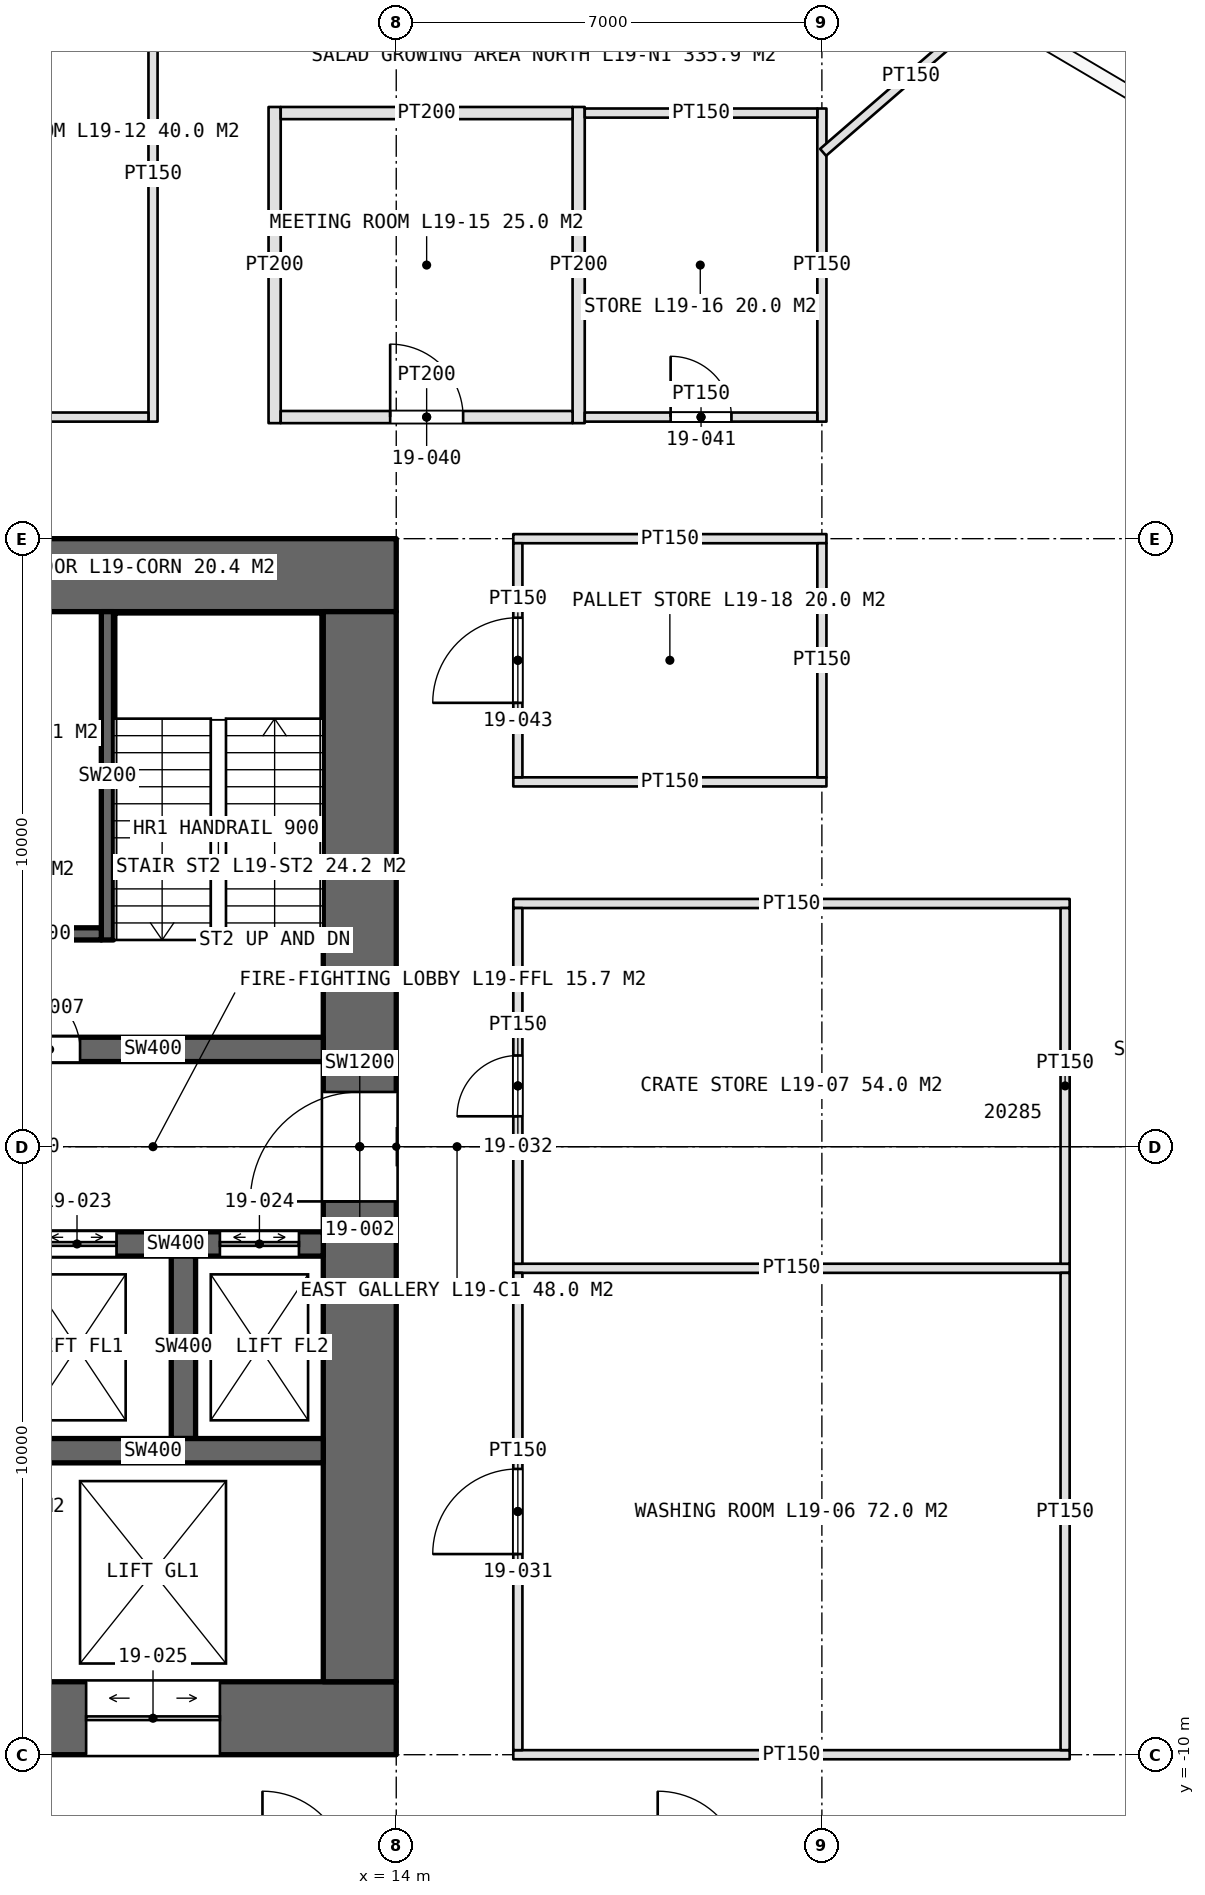
"""IFC4 building model, lengths in metres.
Left out: names, types, materials, properties, quantities, classifications, styles, units other than length and angle.
Written with IfcOpenShell. Run it as: python <this file> out.ifc"""

import sys

from ifc_helpers import new_model, si_unit, direction, frame, frame_2d, origin, place, context, subcontext, project, spatial, rectangle, extrude, element, fill, save


model = new_model("IFC4")
c1 = context("Model", 3, precision=1e-05, world=origin(), true_north=direction((0.0, 1.0)))
c2 = subcontext(c1, "Body", "Model", "MODEL_VIEW")
j1 = project(units=[si_unit("LENGTHUNIT", "METRE"), si_unit("PLANEANGLEUNIT", "RADIAN")], contexts=[c1])
p1 = place(None, origin())
s1 = spatial("IfcSite", under=j1, at=p1, CompositionType="ELEMENT")
p2 = place(p1, origin())
s2 = spatial("IfcBuilding", under=s1, at=p2, CompositionType="ELEMENT")
p3 = place(p2, frame((0.0, 0.0, 95.0)))
s3 = spatial("IfcBuildingStorey", under=s2, at=p3, CompositionType="ELEMENT", Elevation=95.0)
p4 = place(p3, frame((-14.0, -9.4, 0.0), z_axis=(0.0, 0.0, 1.0), x_axis=(1.0, 0.0, 0.0)))
e1 = element("IfcWall", 1, at=p4, inside=s3, PredefinedType="SHEAR", context=c2, shape_type="SweptSolid", body=[
    extrude(rectangle(XDim=28.0, YDim=1.2, at=frame_2d((14.0, 0.0))), origin(), (0.0, 0.0, 1.0), 5.0),
])
p5 = place(p4, frame((13.1, 0.0, 0.0)))
e2 = element("IfcOpeningElement", 2, at=p5, cuts=e1, PredefinedType="OPENING", context=c2, shape_type="SweptSolid", body=[
    extrude(rectangle(XDim=1.8, YDim=2.4, at=frame_2d((0.9, 1.2))), frame((0.0, 0.61, 0.0), z_axis=(0.0, -1.0, 0.0), x_axis=(1.0, 0.0, 0.0)), (0.0, 0.0, 1.0), 1.22),
])
p6 = place(p4, frame((22.9, 0.0, 0.0)))
e3 = element("IfcOpeningElement", 3, at=p6, cuts=e1, PredefinedType="OPENING", context=c2, shape_type="SweptSolid", body=[
    extrude(rectangle(XDim=2.2, YDim=2.7, at=frame_2d((1.1, 1.35))), frame((0.0, 0.61, 0.0), z_axis=(0.0, -1.0, 0.0), x_axis=(1.0, 0.0, 0.0)), (0.0, 0.0, 1.0), 1.22),
])
p7 = place(p3, frame((14.0, 9.4, 0.0), z_axis=(0.0, 0.0, 1.0), x_axis=(-1.0, 0.0, 0.0)))
e4 = element("IfcWall", 4, at=p7, inside=s3, PredefinedType="SHEAR", context=c2, shape_type="SweptSolid", body=[
    extrude(rectangle(XDim=28.0, YDim=1.2, at=frame_2d((14.0, 0.0))), origin(), (0.0, 0.0, 1.0), 5.0),
])
p8 = place(p7, frame((24.0, 0.0, 0.0)))
e5 = element("IfcOpeningElement", 5, at=p8, cuts=e4, PredefinedType="OPENING", context=c2, shape_type="SweptSolid", body=[
    extrude(rectangle(XDim=1.0, YDim=2.4, at=frame_2d((0.5, 1.2))), frame((0.0, 0.61, 0.0), z_axis=(0.0, -1.0, 0.0), x_axis=(1.0, 0.0, 0.0)), (0.0, 0.0, 1.0), 1.22),
])
p9 = place(p7, frame((13.1, 0.0, 0.0)))
e6 = element("IfcOpeningElement", 6, at=p9, cuts=e4, PredefinedType="OPENING", context=c2, shape_type="SweptSolid", body=[
    extrude(rectangle(XDim=1.8, YDim=2.4, at=frame_2d((0.9, 1.2))), frame((0.0, 0.61, 0.0), z_axis=(0.0, -1.0, 0.0), x_axis=(1.0, 0.0, 0.0)), (0.0, 0.0, 1.0), 1.22),
])
p10 = place(p3, frame((13.4, -8.8, 0.0), z_axis=(0.0, 0.0, 1.0), x_axis=(0.0, 1.0, 0.0)))
e7 = element("IfcWall", 7, at=p10, inside=s3, PredefinedType="SHEAR", context=c2, shape_type="SweptSolid", body=[
    extrude(rectangle(XDim=17.6, YDim=1.2, at=frame_2d((8.8, 0.0))), origin(), (0.0, 0.0, 1.0), 5.0),
])
p11 = place(p10, frame((7.9, 0.0, 0.0)))
e8 = element("IfcOpeningElement", 8, at=p11, cuts=e7, PredefinedType="OPENING", context=c2, shape_type="SweptSolid", body=[
    extrude(rectangle(XDim=1.8, YDim=2.4, at=frame_2d((0.9, 1.2))), frame((0.0, 0.61, 0.0), z_axis=(0.0, -1.0, 0.0), x_axis=(1.0, 0.0, 0.0)), (0.0, 0.0, 1.0), 1.22),
])
p12 = place(p3, frame((7.2, 1.6, 0.0), z_axis=(0.0, 0.0, 1.0), x_axis=(1.0, 0.0, 0.0)))
e9 = element("IfcWall", 9, at=p12, inside=s3, PredefinedType="SHEAR", context=c2, shape_type="SweptSolid", body=[
    extrude(rectangle(XDim=5.6, YDim=0.4, at=frame_2d((2.8, 0.0))), origin(), (0.0, 0.0, 1.0), 5.0),
])
p13 = place(p12, frame((0.6, 0.0, 0.0)))
e10 = element("IfcOpeningElement", 10, at=p13, cuts=e9, PredefinedType="OPENING", context=c2, shape_type="SweptSolid", body=[
    extrude(rectangle(XDim=1.0, YDim=2.4, at=frame_2d((0.5, 1.2))), frame((0.0, 0.21, 0.0), z_axis=(0.0, -1.0, 0.0), x_axis=(1.0, 0.0, 0.0)), (0.0, 0.0, 1.0), 0.42),
])
p14 = place(p3, frame((7.2, -1.6, 0.0), z_axis=(0.0, 0.0, 1.0), x_axis=(1.0, 0.0, 0.0)))
e11 = element("IfcWall", 11, at=p14, inside=s3, PredefinedType="SHEAR", context=c2, shape_type="SweptSolid", body=[
    extrude(rectangle(XDim=5.6, YDim=0.4, at=frame_2d((2.8, 0.0))), origin(), (0.0, 0.0, 1.0), 5.0),
])
p15 = place(p14, frame((0.9, 0.0, 0.0)))
e12 = element("IfcOpeningElement", 12, at=p15, cuts=e11, PredefinedType="OPENING", context=c2, shape_type="SweptSolid", body=[
    extrude(rectangle(XDim=1.3, YDim=2.4, at=frame_2d((0.65, 1.2))), frame((0.0, 0.21, 0.0), z_axis=(0.0, -1.0, 0.0), x_axis=(1.0, 0.0, 0.0)), (0.0, 0.0, 1.0), 0.42),
])
p16 = place(p14, frame((3.9, 0.0, 0.0)))
e13 = element("IfcOpeningElement", 13, at=p16, cuts=e11, PredefinedType="OPENING", context=c2, shape_type="SweptSolid", body=[
    extrude(rectangle(XDim=1.3, YDim=2.4, at=frame_2d((0.65, 1.2))), frame((0.0, 0.21, 0.0), z_axis=(0.0, -1.0, 0.0), x_axis=(1.0, 0.0, 0.0)), (0.0, 0.0, 1.0), 0.42),
])
p17 = place(p3, frame((10.5, -4.8, 0.0), z_axis=(0.0, 0.0, 1.0), x_axis=(0.0, 1.0, 0.0)))
e14 = element("IfcWall", 14, at=p17, inside=s3, PredefinedType="SHEAR", context=c2, shape_type="SweptSolid", body=[
    extrude(rectangle(XDim=3.0, YDim=0.4, at=frame_2d((1.5, 0.0))), origin(), (0.0, 0.0, 1.0), 5.0),
])
p18 = place(p3, frame((7.2, -5.0, 0.0), z_axis=(0.0, 0.0, 1.0), x_axis=(1.0, 0.0, 0.0)))
e15 = element("IfcWall", 15, at=p18, inside=s3, PredefinedType="SHEAR", context=c2, shape_type="SweptSolid", body=[
    extrude(rectangle(XDim=5.6, YDim=0.4, at=frame_2d((2.8, 0.0))), origin(), (0.0, 0.0, 1.0), 5.0),
])
p19 = place(p3, frame((9.25, 3.4, 0.0), z_axis=(0.0, 0.0, 1.0), x_axis=(0.0, 1.0, 0.0)))
e16 = element("IfcWall", 16, at=p19, inside=s3, PredefinedType="SOLIDWALL", context=c2, shape_type="SweptSolid", body=[
    extrude(rectangle(XDim=5.4, YDim=0.2, at=frame_2d((2.7, 0.0))), origin(), (0.0, 0.0, 1.0), 5.0),
])
p20 = place(p3, frame((9.15, 3.5, 0.0), z_axis=(0.0, 0.0, 1.0), x_axis=(-1.0, 0.0, 0.0)))
e17 = element("IfcWall", 17, at=p20, inside=s3, PredefinedType="SOLIDWALL", context=c2, shape_type="SweptSolid", body=[
    extrude(rectangle(XDim=1.95, YDim=0.2, at=frame_2d((0.975, 0.0))), origin(), (0.0, 0.0, 1.0), 5.0),
])
for number, where, z_axis, x_axis in (
    (18, (15.925, -10.0, 0.0), (0.0, 0.0, 1.0), (1.0, 0.0, 0.0)),
    (19, (15.925, -2.0, 0.0), (0.0, 0.0, 1.0), (1.0, 0.0, 0.0)),
    (20, (15.925, 4.0, 0.0), (0.0, 0.0, 1.0), (1.0, 0.0, 0.0)),
):
    element("IfcWall", number, at=place(p3, frame(where, z_axis=z_axis, x_axis=x_axis)), inside=s3, PredefinedType="PARTITIONING", context=c2, shape_type="SweptSolid", body=[
        extrude(rectangle(XDim=9.15, YDim=0.15, at=frame_2d((4.575, 0.0))), origin(), (0.0, 0.0, 1.0), 3.6),
    ])
p21 = place(p3, frame((16.0, -9.925, 0.0), z_axis=(0.0, 0.0, 1.0), x_axis=(0.0, 1.0, 0.0)))
e21 = element("IfcWall", 21, at=p21, inside=s3, PredefinedType="PARTITIONING", context=c2, shape_type="SweptSolid", body=[
    extrude(rectangle(XDim=7.85, YDim=0.15, at=frame_2d((3.925, 0.0))), origin(), (0.0, 0.0, 1.0), 3.6),
])
p22 = place(p21, frame((3.225, 0.0, 0.0)))
e22 = element("IfcOpeningElement", 22, at=p22, cuts=e21, PredefinedType="OPENING", context=c2, shape_type="SweptSolid", body=[
    extrude(rectangle(XDim=1.4, YDim=2.4, at=frame_2d((0.7, 1.2))), frame((0.0, 0.085, 0.0), z_axis=(0.0, -1.0, 0.0), x_axis=(1.0, 0.0, 0.0)), (0.0, 0.0, 1.0), 0.17),
])
p23 = place(p3, frame((25.0, -9.925, 0.0), z_axis=(0.0, 0.0, 1.0), x_axis=(0.0, 1.0, 0.0)))
e23 = element("IfcWall", 23, at=p23, inside=s3, PredefinedType="PARTITIONING", context=c2, shape_type="SweptSolid", body=[
    extrude(rectangle(XDim=7.85, YDim=0.15, at=frame_2d((3.925, 0.0))), origin(), (0.0, 0.0, 1.0), 3.6),
])
p24 = place(p3, frame((16.0, -1.925, 0.0), z_axis=(0.0, 0.0, 1.0), x_axis=(0.0, 1.0, 0.0)))
e24 = element("IfcWall", 24, at=p24, inside=s3, PredefinedType="PARTITIONING", context=c2, shape_type="SweptSolid", body=[
    extrude(rectangle(XDim=5.85, YDim=0.15, at=frame_2d((2.925, 0.0))), origin(), (0.0, 0.0, 1.0), 3.6),
])
p25 = place(p24, frame((2.425, 0.0, 0.0)))
e25 = element("IfcOpeningElement", 25, at=p25, cuts=e24, PredefinedType="OPENING", context=c2, shape_type="SweptSolid", body=[
    extrude(rectangle(XDim=1.0, YDim=2.2, at=frame_2d((0.5, 1.1))), frame((0.0, 0.085, 0.0), z_axis=(0.0, -1.0, 0.0), x_axis=(1.0, 0.0, 0.0)), (0.0, 0.0, 1.0), 0.17),
])
p26 = place(p3, frame((25.0, -1.925, 0.0), z_axis=(0.0, 0.0, 1.0), x_axis=(0.0, 1.0, 0.0)))
e26 = element("IfcWall", 26, at=p26, inside=s3, PredefinedType="PARTITIONING", context=c2, shape_type="SweptSolid", body=[
    extrude(rectangle(XDim=5.85, YDim=0.15, at=frame_2d((2.925, 0.0))), origin(), (0.0, 0.0, 1.0), 3.6),
])
p27 = place(p3, frame((10.0, 11.925, 0.0), z_axis=(0.0, 0.0, 1.0), x_axis=(0.0, 1.0, 0.0)))
e27 = element("IfcWall", 27, at=p27, inside=s3, PredefinedType="PARTITIONING", context=c2, shape_type="SweptSolid", body=[
    extrude(rectangle(XDim=8.15, YDim=0.15, at=frame_2d((4.075, 0.0))), origin(), (0.0, 0.0, 1.0), 3.6),
])
p28 = place(p3, frame((5.075, 12.0, 0.0), z_axis=(0.0, 0.0, 1.0), x_axis=(1.0, 0.0, 0.0)))
e28 = element("IfcWall", 28, at=p28, inside=s3, PredefinedType="PARTITIONING", context=c2, shape_type="SweptSolid", body=[
    extrude(rectangle(XDim=4.85, YDim=0.15, at=frame_2d((2.425, 0.0))), origin(), (0.0, 0.0, 1.0), 3.6),
])
p29 = place(p28, frame((1.925, 0.0, 0.0)))
e29 = element("IfcOpeningElement", 29, at=p29, cuts=e28, PredefinedType="OPENING", context=c2, shape_type="SweptSolid", body=[
    extrude(rectangle(XDim=1.0, YDim=2.2, at=frame_2d((0.5, 1.1))), frame((0.0, 0.085, 0.0), z_axis=(0.0, -1.0, 0.0), x_axis=(1.0, 0.0, 0.0)), (0.0, 0.0, 1.0), 0.17),
])
for number, where, z_axis, x_axis in (
    (30, (12.0, 11.9, 0.0), (0.0, 0.0, 1.0), (0.0, 1.0, 0.0)),
    (31, (17.0, 11.9, 0.0), (0.0, 0.0, 1.0), (0.0, 1.0, 0.0)),
):
    element("IfcWall", number, at=place(p3, frame(where, z_axis=z_axis, x_axis=x_axis)), inside=s3, PredefinedType="PARTITIONING", context=c2, shape_type="SweptSolid", body=[
        extrude(rectangle(XDim=5.2, YDim=0.2, at=frame_2d((2.6, 0.0))), origin(), (0.0, 0.0, 1.0), 3.6),
    ])
p30 = place(p3, frame((21.0, 11.925, 0.0), z_axis=(0.0, 0.0, 1.0), x_axis=(0.0, 1.0, 0.0)))
e32 = element("IfcWall", 32, at=p30, inside=s3, PredefinedType="PARTITIONING", context=c2, shape_type="SweptSolid", body=[
    extrude(rectangle(XDim=5.15, YDim=0.15, at=frame_2d((2.575, 0.0))), origin(), (0.0, 0.0, 1.0), 3.6),
])
p31 = place(p3, frame((12.1, 12.0, 0.0), z_axis=(0.0, 0.0, 1.0), x_axis=(1.0, 0.0, 0.0)))
e33 = element("IfcWall", 33, at=p31, inside=s3, PredefinedType="PARTITIONING", context=c2, shape_type="SweptSolid", body=[
    extrude(rectangle(XDim=4.8, YDim=0.2, at=frame_2d((2.4, 0.0))), origin(), (0.0, 0.0, 1.0), 3.6),
])
p32 = place(p31, frame((1.8, 0.0, 0.0)))
e34 = element("IfcOpeningElement", 34, at=p32, cuts=e33, PredefinedType="OPENING", context=c2, shape_type="SweptSolid", body=[
    extrude(rectangle(XDim=1.2, YDim=2.4, at=frame_2d((0.6, 1.2))), frame((0.0, 0.11, 0.0), z_axis=(0.0, -1.0, 0.0), x_axis=(1.0, 0.0, 0.0)), (0.0, 0.0, 1.0), 0.22),
])
p33 = place(p3, frame((12.1, 17.0, 0.0), z_axis=(0.0, 0.0, 1.0), x_axis=(1.0, 0.0, 0.0)))
e35 = element("IfcWall", 35, at=p33, inside=s3, PredefinedType="PARTITIONING", context=c2, shape_type="SweptSolid", body=[
    extrude(rectangle(XDim=4.8, YDim=0.2, at=frame_2d((2.4, 0.0))), origin(), (0.0, 0.0, 1.0), 3.6),
])
p34 = place(p3, frame((17.1, 12.0, 0.0), z_axis=(0.0, 0.0, 1.0), x_axis=(1.0, 0.0, 0.0)))
e36 = element("IfcWall", 36, at=p34, inside=s3, PredefinedType="PARTITIONING", context=c2, shape_type="SweptSolid", body=[
    extrude(rectangle(XDim=3.825, YDim=0.15, at=frame_2d((1.913, 0.0))), origin(), (0.0, 0.0, 1.0), 3.6),
])
p35 = place(p34, frame((1.413, 0.0, 0.0)))
e37 = element("IfcOpeningElement", 37, at=p35, cuts=e36, PredefinedType="OPENING", context=c2, shape_type="SweptSolid", body=[
    extrude(rectangle(XDim=1.0, YDim=2.2, at=frame_2d((0.5, 1.1))), frame((0.0, 0.085, 0.0), z_axis=(0.0, -1.0, 0.0), x_axis=(1.0, 0.0, 0.0)), (0.0, 0.0, 1.0), 0.17),
])
p36 = place(p3, frame((17.1, 17.0, 0.0), z_axis=(0.0, 0.0, 1.0), x_axis=(1.0, 0.0, 0.0)))
e38 = element("IfcWall", 38, at=p36, inside=s3, PredefinedType="PARTITIONING", context=c2, shape_type="SweptSolid", body=[
    extrude(rectangle(XDim=3.825, YDim=0.15, at=frame_2d((1.913, 0.0))), origin(), (0.0, 0.0, 1.0), 3.6),
])
for number, where, z_axis, x_axis in (
    (39, (15.925, 6.0, 0.0), (0.0, 0.0, 1.0), (1.0, 0.0, 0.0)),
    (40, (15.925, 10.0, 0.0), (0.0, 0.0, 1.0), (1.0, 0.0, 0.0)),
):
    element("IfcWall", number, at=place(p3, frame(where, z_axis=z_axis, x_axis=x_axis)), inside=s3, PredefinedType="PARTITIONING", context=c2, shape_type="SweptSolid", body=[
        extrude(rectangle(XDim=5.15, YDim=0.15, at=frame_2d((2.575, 0.0))), origin(), (0.0, 0.0, 1.0), 3.6),
    ])
p37 = place(p3, frame((16.0, 6.075, 0.0), z_axis=(0.0, 0.0, 1.0), x_axis=(0.0, 1.0, 0.0)))
e41 = element("IfcWall", 41, at=p37, inside=s3, PredefinedType="PARTITIONING", context=c2, shape_type="SweptSolid", body=[
    extrude(rectangle(XDim=3.85, YDim=0.15, at=frame_2d((1.925, 0.0))), origin(), (0.0, 0.0, 1.0), 3.6),
])
p38 = place(p37, frame((1.225, 0.0, 0.0)))
e42 = element("IfcOpeningElement", 42, at=p38, cuts=e41, PredefinedType="OPENING", context=c2, shape_type="SweptSolid", body=[
    extrude(rectangle(XDim=1.4, YDim=2.4, at=frame_2d((0.7, 1.2))), frame((0.0, 0.085, 0.0), z_axis=(0.0, -1.0, 0.0), x_axis=(1.0, 0.0, 0.0)), (0.0, 0.0, 1.0), 0.17),
])
p39 = place(p3, frame((21.0, 6.075, 0.0), z_axis=(0.0, 0.0, 1.0), x_axis=(0.0, 1.0, 0.0)))
e43 = element("IfcWall", 43, at=p39, inside=s3, PredefinedType="PARTITIONING", context=c2, shape_type="SweptSolid", body=[
    extrude(rectangle(XDim=3.85, YDim=0.15, at=frame_2d((1.925, 0.0))), origin(), (0.0, 0.0, 1.0), 3.6),
])
p40 = place(p3, frame((21.02, 16.354, 0.0), z_axis=(0.0, 0.0, 1.0), x_axis=(0.755425653008, 0.655234372402, 0.0)))
e44 = element("IfcWall", 44, at=p40, inside=s3, PredefinedType="PARTITIONING", context=c2, shape_type="SweptSolid", body=[
    extrude(rectangle(XDim=3.823, YDim=0.15, at=frame_2d((1.912, 0.0))), origin(), (0.0, 0.0, 1.0), 3.6),
])
p41 = place(p11, origin())
e45 = element("IfcDoor", 45, at=p41, inside=s3, OperationType="DOUBLE_DOOR_SINGLE_SWING", PredefinedType="DOOR", context=c2, shape_type="SweptSolid", body=[
    extrude(rectangle(XDim=1.8, YDim=2.4, at=frame_2d((0.9, 1.2))), frame((0.0, 0.025, 0.0), z_axis=(0.0, -1.0, 0.0), x_axis=(1.0, 0.0, 0.0)), (0.0, 0.0, 1.0), 0.05),
])
fill(e8, e45)
p42 = place(p13, origin())
e46 = element("IfcDoor", 46, at=p42, inside=s3, OperationType="SINGLE_SWING_LEFT", PredefinedType="DOOR", context=c2, shape_type="SweptSolid", body=[
    extrude(rectangle(XDim=1.0, YDim=2.4, at=frame_2d((0.5, 1.2))), frame((0.0, 0.025, 0.0), z_axis=(0.0, -1.0, 0.0), x_axis=(1.0, 0.0, 0.0)), (0.0, 0.0, 1.0), 0.05),
])
fill(e10, e46)
p43 = place(p15, origin())
e47 = element("IfcDoor", 47, at=p43, inside=s3, OperationType="DOUBLE_DOOR_SLIDING", PredefinedType="DOOR", context=c2, shape_type="SweptSolid", body=[
    extrude(rectangle(XDim=1.3, YDim=2.4, at=frame_2d((0.65, 1.2))), frame((0.0, 0.025, 0.0), z_axis=(0.0, -1.0, 0.0), x_axis=(1.0, 0.0, 0.0)), (0.0, 0.0, 1.0), 0.05),
])
fill(e12, e47)
p44 = place(p16, origin())
e48 = element("IfcDoor", 48, at=p44, inside=s3, OperationType="DOUBLE_DOOR_SLIDING", PredefinedType="DOOR", context=c2, shape_type="SweptSolid", body=[
    extrude(rectangle(XDim=1.3, YDim=2.4, at=frame_2d((0.65, 1.2))), frame((0.0, 0.025, 0.0), z_axis=(0.0, -1.0, 0.0), x_axis=(1.0, 0.0, 0.0)), (0.0, 0.0, 1.0), 0.05),
])
fill(e13, e48)
p45 = place(p6, origin())
e49 = element("IfcDoor", 49, at=p45, inside=s3, OperationType="DOUBLE_DOOR_SLIDING", PredefinedType="DOOR", context=c2, shape_type="SweptSolid", body=[
    extrude(rectangle(XDim=2.2, YDim=2.7, at=frame_2d((1.1, 1.35))), frame((0.0, 0.025, 0.0), z_axis=(0.0, -1.0, 0.0), x_axis=(1.0, 0.0, 0.0)), (0.0, 0.0, 1.0), 0.05),
])
fill(e3, e49)
p46 = place(p22, origin())
e50 = element("IfcDoor", 50, at=p46, inside=s3, OperationType="DOUBLE_DOOR_DOUBLE_SWING", PredefinedType="DOOR", context=c2, shape_type="SweptSolid", body=[
    extrude(rectangle(XDim=1.4, YDim=2.4, at=frame_2d((0.7, 1.2))), frame((0.0, 0.025, 0.0), z_axis=(0.0, -1.0, 0.0), x_axis=(1.0, 0.0, 0.0)), (0.0, 0.0, 1.0), 0.05),
])
fill(e22, e50)
p47 = place(p25, origin())
e51 = element("IfcDoor", 51, at=p47, inside=s3, OperationType="SINGLE_SWING_LEFT", PredefinedType="DOOR", context=c2, shape_type="SweptSolid", body=[
    extrude(rectangle(XDim=1.0, YDim=2.2, at=frame_2d((0.5, 1.1))), frame((0.0, 0.025, 0.0), z_axis=(0.0, -1.0, 0.0), x_axis=(1.0, 0.0, 0.0)), (0.0, 0.0, 1.0), 0.05),
])
fill(e25, e51)
p48 = place(p32, origin())
e52 = element("IfcDoor", 52, at=p48, inside=s3, OperationType="SINGLE_SWING_LEFT", PredefinedType="DOOR", context=c2, shape_type="SweptSolid", body=[
    extrude(rectangle(XDim=1.2, YDim=2.4, at=frame_2d((0.6, 1.2))), frame((0.0, 0.025, 0.0), z_axis=(0.0, -1.0, 0.0), x_axis=(1.0, 0.0, 0.0)), (0.0, 0.0, 1.0), 0.05),
])
fill(e34, e52)
p49 = place(p35, origin())
e53 = element("IfcDoor", 53, at=p49, inside=s3, OperationType="SINGLE_SWING_LEFT", PredefinedType="DOOR", context=c2, shape_type="SweptSolid", body=[
    extrude(rectangle(XDim=1.0, YDim=2.2, at=frame_2d((0.5, 1.1))), frame((0.0, 0.025, 0.0), z_axis=(0.0, -1.0, 0.0), x_axis=(1.0, 0.0, 0.0)), (0.0, 0.0, 1.0), 0.05),
])
fill(e37, e53)
p50 = place(p38, origin())
e54 = element("IfcDoor", 54, at=p50, inside=s3, OperationType="DOUBLE_DOOR_DOUBLE_SWING", PredefinedType="DOOR", context=c2, shape_type="SweptSolid", body=[
    extrude(rectangle(XDim=1.4, YDim=2.4, at=frame_2d((0.7, 1.2))), frame((0.0, 0.025, 0.0), z_axis=(0.0, -1.0, 0.0), x_axis=(1.0, 0.0, 0.0)), (0.0, 0.0, 1.0), 0.05),
])
fill(e42, e54)
save(model, sys.argv[1])
